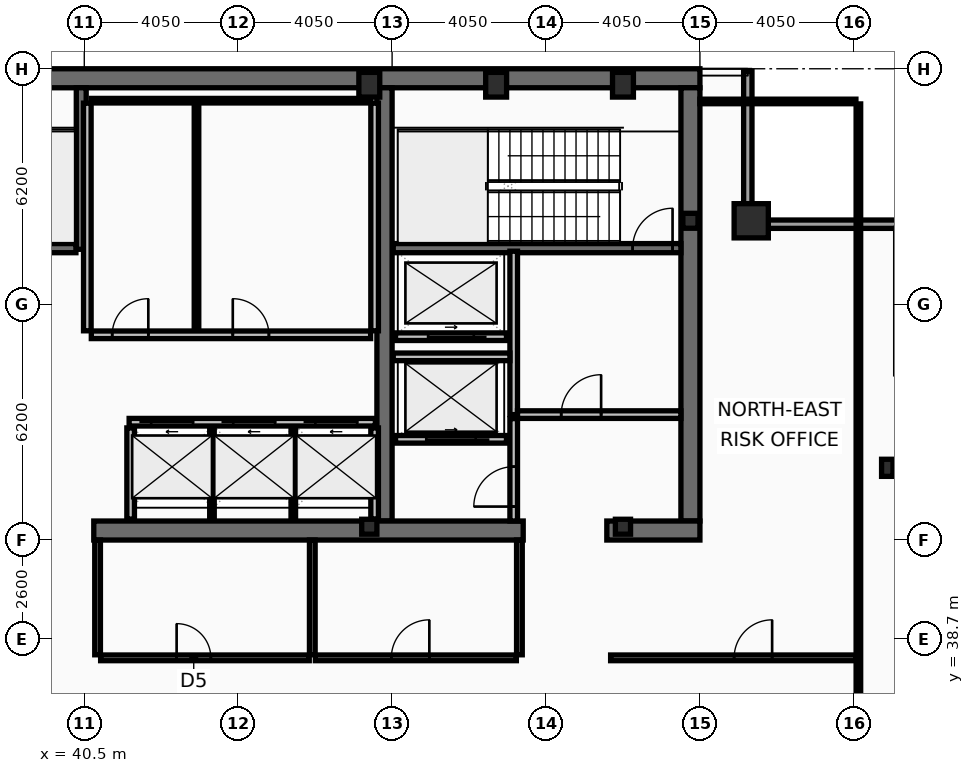
"""IFC4 building model, lengths in metres.
Left out: names, types, materials, properties, quantities, classifications, styles, units other than length and angle.
Written with IfcOpenShell. Run it as: python <this file> out.ifc"""

import sys

from ifc_helpers import new_model, si_unit, direction, frame, frame_2d, origin, origin_2d, place, context, subcontext, project, spatial, rectangle, hollow_rectangle, i_section, extrude, element, fill, save


model = new_model("IFC4")
c1 = context("Model", 3, precision=1e-05, world=origin(), true_north=direction((0.0, 1.0)))
c2 = subcontext(c1, "Body", "Model", "MODEL_VIEW")
j1 = project(units=[si_unit("LENGTHUNIT", "METRE"), si_unit("PLANEANGLEUNIT", "RADIAN")], contexts=[c1])
p1 = place(None, origin())
s1 = spatial("IfcSite", under=j1, at=p1, CompositionType="ELEMENT")
p2 = place(p1, origin())
s2 = spatial("IfcBuilding", under=s1, at=p2, CompositionType="ELEMENT")
p3 = place(p2, frame((0.0, 0.0, 310.2)))
s3 = spatial("IfcBuildingStorey", under=s2, at=p3, CompositionType="ELEMENT", Elevation=310.2)
p4 = place(p3, frame((16.2, 53.45, 0.0), z_axis=(0.0, 0.0, 1.0), x_axis=(1.0, 0.0, 0.0)))
e1 = element("IfcWall", 1, at=p4, inside=s3, PredefinedType="SHEAR", context=c2, shape_type="SweptSolid", body=[
    extrude(rectangle(XDim=40.5, YDim=0.5, at=frame_2d((20.25, 0.0))), origin(), (0.0, 0.0, 1.0), 4.24),
])
p5 = place(p3, frame((56.45, 53.2, 0.0), z_axis=(0.0, 0.0, 1.0), x_axis=(0.0, -1.0, 0.0)))
e2 = element("IfcWall", 2, at=p5, inside=s3, PredefinedType="SHEAR", context=c2, shape_type="SweptSolid", body=[
    extrude(rectangle(XDim=11.4, YDim=0.5, at=frame_2d((5.7, 0.0))), origin(), (0.0, 0.0, 1.0), 4.24),
])
p6 = place(p3, frame((48.4, 41.8, 0.0), z_axis=(0.0, 0.0, 1.0), x_axis=(0.0, 1.0, 0.0)))
e3 = element("IfcWall", 3, at=p6, inside=s3, PredefinedType="SHEAR", context=c2, shape_type="SweptSolid", body=[
    extrude(rectangle(XDim=11.4, YDim=0.4, at=frame_2d((5.7, 0.0))), origin(), (0.0, 0.0, 1.0), 4.24),
])
p7 = place(p3, frame((52.05, 41.55, 0.0), z_axis=(0.0, 0.0, 1.0), x_axis=(-1.0, 0.0, 0.0)))
e4 = element("IfcWall", 4, at=p7, inside=s3, PredefinedType="SHEAR", context=c2, shape_type="SweptSolid", body=[
    extrude(rectangle(XDim=11.3, YDim=0.5, at=frame_2d((5.65, 0.0))), origin(), (0.0, 0.0, 1.0), 4.24),
])
p8 = place(p3, frame((56.7, 41.55, 0.0), z_axis=(0.0, 0.0, 1.0), x_axis=(-1.0, 0.0, 0.0)))
e5 = element("IfcWall", 5, at=p8, inside=s3, PredefinedType="SHEAR", context=c2, shape_type="SweptSolid", body=[
    extrude(rectangle(XDim=2.45, YDim=0.5, at=frame_2d((1.225, 0.0))), origin(), (0.0, 0.0, 1.0), 4.24),
])
p9 = place(p3, frame((40.42, 48.95, 0.0), z_axis=(0.0, 0.0, 1.0), x_axis=(0.0, 1.0, 0.0)))
e6 = element("IfcWall", 6, at=p9, inside=s3, PredefinedType="SHEAR", context=c2, shape_type="SweptSolid", body=[
    extrude(rectangle(XDim=4.25, YDim=0.26, at=frame_2d((2.125, 0.0))), origin(), (0.0, 0.0, 1.0), 4.24),
])
p10 = place(p3, frame((48.63, 48.98, 0.0), z_axis=(0.0, 0.0, 1.0), x_axis=(1.0, 0.0, 0.0)))
e7 = element("IfcWall", 7, at=p10, inside=s3, PredefinedType="SHEAR", context=c2, shape_type="SweptSolid", body=[
    extrude(rectangle(XDim=7.57, YDim=0.24, at=frame_2d((3.785, 0.0))), origin(), (0.0, 0.0, 1.0), 4.24),
])
p11 = place(p10, frame((6.3, 0.0, 0.0)))
e8 = element("IfcOpeningElement", 8, at=p11, cuts=e7, PredefinedType="OPENING", context=c2, shape_type="SweptSolid", body=[
    extrude(rectangle(XDim=1.05, YDim=2.15, at=frame_2d((0.525, 1.075))), frame((0.0, 0.13, 0.0), z_axis=(0.0, -1.0, 0.0), x_axis=(1.0, 0.0, 0.0)), (0.0, 0.0, 1.0), 0.26),
])
p12 = place(p3, frame((32.72, 48.98, 0.0), z_axis=(0.0, 0.0, 1.0), x_axis=(1.0, 0.0, 0.0)))
e9 = element("IfcWall", 9, at=p12, inside=s3, PredefinedType="SHEAR", context=c2, shape_type="SweptSolid", body=[
    extrude(rectangle(XDim=7.56, YDim=0.24, at=frame_2d((3.78, 0.0))), origin(), (0.0, 0.0, 1.0), 4.24),
])
p13 = place(p12, frame((0.22, 0.0, 0.0)))
e10 = element("IfcOpeningElement", 10, at=p13, cuts=e9, PredefinedType="OPENING", context=c2, shape_type="SweptSolid", body=[
    extrude(rectangle(XDim=1.05, YDim=2.15, at=frame_2d((0.525, 1.075))), frame((0.0, 0.13, 0.0), z_axis=(0.0, -1.0, 0.0), x_axis=(1.0, 0.0, 0.0)), (0.0, 0.0, 1.0), 0.26),
])
p14 = place(p3, frame((58.05, 49.7, 0.0), z_axis=(0.0, 0.0, 1.0), x_axis=(1.0, 0.0, 0.0)))
e11 = element("IfcColumn", 11, at=p14, inside=s3, PredefinedType="COLUMN", context=c2, shape_type="SweptSolid", body=[
    extrude(hollow_rectangle(XDim=0.9, YDim=0.9, WallThickness=0.05, at=origin_2d()), origin(), (0.0, 0.0, 1.0), 4.4),
])
for number, where, z_axis, x_axis in (
    (12, (48.0, 53.28, 0.0), (0.0, 0.0, 1.0), (1.0, 0.0, 0.0)),
    (13, (51.337, 53.28, 0.0), (0.0, 0.0, 1.0), (1.0, 0.0, 0.0)),
    (14, (54.675, 53.28, 0.0), (0.0, 0.0, 1.0), (1.0, 0.0, 0.0)),
):
    element("IfcColumn", number, at=place(p3, frame(where, z_axis=z_axis, x_axis=x_axis)), inside=s3, PredefinedType="COLUMN", context=c2, shape_type="SweptSolid", body=[
        extrude(hollow_rectangle(XDim=0.55, YDim=0.65, WallThickness=0.04, at=origin_2d()), origin(), (0.0, 0.0, 1.0), 4.4),
    ])
p15 = place(p3, frame((61.63, 43.2, 0.0), z_axis=(0.0, 0.0, 1.0), x_axis=(1.0, 0.0, 0.0)))
e15 = element("IfcColumn", 15, at=p15, inside=s3, PredefinedType="COLUMN", context=c2, shape_type="SweptSolid", body=[
    extrude(i_section(OverallWidth=0.3, OverallDepth=0.45, WebThickness=0.014, FlangeThickness=0.026, at=origin_2d()), origin(), (0.0, 0.0, 1.0), 4.4),
])
for number, where, z_axis, x_axis in (
    (16, (56.45, 49.7, 0.0), (0.0, 0.0, 1.0), (1.0, 0.0, 0.0)),
    (17, (48.0, 41.65, 0.0), (0.0, 0.0, 1.0), (1.0, 0.0, 0.0)),
    (18, (54.675, 41.65, 0.0), (0.0, 0.0, 1.0), (1.0, 0.0, 0.0)),
):
    element("IfcColumn", number, at=place(p3, frame(where, z_axis=z_axis, x_axis=x_axis)), inside=s3, PredefinedType="COLUMN", context=c2, shape_type="SweptSolid", body=[
        extrude(i_section(OverallWidth=0.399, OverallDepth=0.393, WebThickness=0.023, FlangeThickness=0.037, at=origin_2d()), origin(), (0.0, 0.0, 1.0), 4.4),
    ])
p16 = place(p3, frame((57.96, 53.63, 0.0), z_axis=(0.0, 0.0, 1.0), x_axis=(0.0, -1.0, 0.0)))
e19 = element("IfcWall", 19, at=p16, inside=s3, PredefinedType="SOLIDWALL", context=c2, shape_type="SweptSolid", body=[
    extrude(rectangle(XDim=3.91, YDim=0.22, at=frame_2d((1.955, 0.0))), origin(), (0.0, 0.0, 1.0), 3.68),
])
p17 = place(p3, frame((57.85, 49.61, 0.0), z_axis=(0.0, 0.0, 1.0), x_axis=(1.0, 0.0, 0.0)))
e20 = element("IfcWall", 20, at=p17, inside=s3, PredefinedType="SOLIDWALL", context=c2, shape_type="SweptSolid", body=[
    extrude(rectangle(XDim=4.22, YDim=0.22, at=frame_2d((2.11, 0.0))), origin(), (0.0, 0.0, 1.0), 3.68),
])
p18 = place(p3, frame((41.68, 44.4, 0.0), z_axis=(0.0, 0.0, 1.0), x_axis=(1.0, 0.0, 0.0)))
e21 = element("IfcWall", 21, at=p18, inside=s3, PredefinedType="PARTITIONING", context=c2, shape_type="SweptSolid", body=[
    extrude(rectangle(XDim=6.48, YDim=0.2, at=frame_2d((3.24, 0.0))), origin(), (0.0, 0.0, 1.0), 4.24),
])
p19 = place(p18, frame((0.58, 0.0, 0.0)))
e22 = element("IfcOpeningElement", 22, at=p19, cuts=e21, PredefinedType="OPENING", context=c2, shape_type="SweptSolid", body=[
    extrude(rectangle(XDim=1.1, YDim=2.18, at=frame_2d((0.55, 1.09))), frame((0.0, 0.11, 0.0), z_axis=(0.0, -1.0, 0.0), x_axis=(1.0, 0.0, 0.0)), (0.0, 0.0, 1.0), 0.22),
])
p20 = place(p18, frame((2.74, 0.0, 0.0)))
e23 = element("IfcOpeningElement", 23, at=p20, cuts=e21, PredefinedType="OPENING", context=c2, shape_type="SweptSolid", body=[
    extrude(rectangle(XDim=1.1, YDim=2.18, at=frame_2d((0.55, 1.09))), frame((0.0, 0.11, 0.0), z_axis=(0.0, -1.0, 0.0), x_axis=(1.0, 0.0, 0.0)), (0.0, 0.0, 1.0), 0.22),
])
p21 = place(p18, frame((4.9, 0.0, 0.0)))
e24 = element("IfcOpeningElement", 24, at=p21, cuts=e21, PredefinedType="OPENING", context=c2, shape_type="SweptSolid", body=[
    extrude(rectangle(XDim=1.1, YDim=2.18, at=frame_2d((0.55, 1.09))), frame((0.0, 0.11, 0.0), z_axis=(0.0, -1.0, 0.0), x_axis=(1.0, 0.0, 0.0)), (0.0, 0.0, 1.0), 0.22),
])
p22 = place(p3, frame((51.61, 43.95, 0.0), z_axis=(0.0, 0.0, 1.0), x_axis=(-1.0, 0.0, 0.0)))
e25 = element("IfcWall", 25, at=p22, inside=s3, PredefinedType="PARTITIONING", context=c2, shape_type="SweptSolid", body=[
    extrude(rectangle(XDim=2.92, YDim=0.2, at=frame_2d((1.46, 0.0))), origin(), (0.0, 0.0, 1.0), 4.24),
])
p23 = place(p22, frame((0.81, 0.0, 0.0)))
e26 = element("IfcOpeningElement", 26, at=p23, cuts=e25, PredefinedType="OPENING", context=c2, shape_type="SweptSolid", body=[
    extrude(rectangle(XDim=1.3, YDim=2.18, at=frame_2d((0.65, 1.09))), frame((0.0, 0.11, 0.0), z_axis=(0.0, -1.0, 0.0), x_axis=(1.0, 0.0, 0.0)), (0.0, 0.0, 1.0), 0.22),
])
p24 = place(p3, frame((51.61, 46.65, 0.0), z_axis=(0.0, 0.0, 1.0), x_axis=(-1.0, 0.0, 0.0)))
e27 = element("IfcWall", 27, at=p24, inside=s3, PredefinedType="PARTITIONING", context=c2, shape_type="SweptSolid", body=[
    extrude(rectangle(XDim=2.92, YDim=0.2, at=frame_2d((1.46, 0.0))), origin(), (0.0, 0.0, 1.0), 4.24),
])
p25 = place(p24, frame((0.86, 0.0, 0.0)))
e28 = element("IfcOpeningElement", 28, at=p25, cuts=e27, PredefinedType="OPENING", context=c2, shape_type="SweptSolid", body=[
    extrude(rectangle(XDim=1.2, YDim=2.18, at=frame_2d((0.6, 1.09))), frame((0.0, 0.11, 0.0), z_axis=(0.0, -1.0, 0.0), x_axis=(1.0, 0.0, 0.0)), (0.0, 0.0, 1.0), 0.22),
])
p26 = place(p3, frame((51.8, 44.6, 0.0), z_axis=(0.0, 0.0, 1.0), x_axis=(0.0, 1.0, 0.0)))
e29 = element("IfcWall", 29, at=p26, inside=s3, PredefinedType="PARTITIONING", context=c2, shape_type="SweptSolid", body=[
    extrude(rectangle(XDim=4.3, YDim=0.2, at=frame_2d((2.15, 0.0))), origin(), (0.0, 0.0, 1.0), 4.24),
])
p27 = place(p3, frame((51.9, 44.6, 0.0), z_axis=(0.0, 0.0, 1.0), x_axis=(1.0, 0.0, 0.0)))
e30 = element("IfcWall", 30, at=p27, inside=s3, PredefinedType="PARTITIONING", context=c2, shape_type="SweptSolid", body=[
    extrude(rectangle(XDim=4.3, YDim=0.2, at=frame_2d((2.15, 0.0))), origin(), (0.0, 0.0, 1.0), 4.24),
])
p28 = place(p27, frame((1.15, 0.0, 0.0)))
e31 = element("IfcOpeningElement", 31, at=p28, cuts=e30, PredefinedType="OPENING", context=c2, shape_type="SweptSolid", body=[
    extrude(rectangle(XDim=1.05, YDim=2.15, at=frame_2d((0.525, 1.075))), frame((0.0, 0.11, 0.0), z_axis=(0.0, -1.0, 0.0), x_axis=(1.0, 0.0, 0.0)), (0.0, 0.0, 1.0), 0.22),
])
p29 = place(p3, frame((48.63, 46.12, 0.0), z_axis=(0.0, 0.0, 1.0), x_axis=(1.0, 0.0, 0.0)))
e32 = element("IfcWall", 32, at=p29, inside=s3, PredefinedType="PARTITIONING", context=c2, shape_type="SweptSolid", body=[
    extrude(rectangle(XDim=3.07, YDim=0.2, at=frame_2d((1.535, 0.0))), origin(), (0.0, 0.0, 1.0), 4.24),
])
p30 = place(p3, frame((51.8, 41.8, 0.0), z_axis=(0.0, 0.0, 1.0), x_axis=(0.0, 1.0, 0.0)))
e33 = element("IfcWall", 33, at=p30, inside=s3, PredefinedType="PARTITIONING", context=c2, shape_type="SweptSolid", body=[
    extrude(rectangle(XDim=2.695, YDim=0.2, at=frame_2d((1.348, 0.0))), origin(), (0.0, 0.0, 1.0), 4.24),
])
p31 = place(p30, frame((0.38, 0.0, 0.0)))
e34 = element("IfcOpeningElement", 34, at=p31, cuts=e33, PredefinedType="OPENING", context=c2, shape_type="SweptSolid", body=[
    extrude(rectangle(XDim=1.05, YDim=2.15, at=frame_2d((0.525, 1.075))), frame((0.0, 0.11, 0.0), z_axis=(0.0, -1.0, 0.0), x_axis=(1.0, 0.0, 0.0)), (0.0, 0.0, 1.0), 0.22),
])
for number, where, z_axis, x_axis in (
    (35, (40.58, 46.805, 0.0), (0.0, 0.0, 1.0), (0.0, 1.0, 0.0)),
    (36, (48.14, 46.805, 0.0), (0.0, 0.0, 1.0), (0.0, 1.0, 0.0)),
):
    element("IfcWall", number, at=place(p3, frame(where, z_axis=z_axis, x_axis=x_axis)), inside=s3, PredefinedType="PARTITIONING", context=c2, shape_type="SweptSolid", body=[
        extrude(rectangle(XDim=5.99, YDim=0.2, at=frame_2d((2.995, 0.0))), origin(), (0.0, 0.0, 1.0), 4.24),
    ])
p32 = place(p3, frame((40.685, 52.86, 0.0), z_axis=(0.0, 0.0, 1.0), x_axis=(1.0, 0.0, 0.0)))
e37 = element("IfcWall", 37, at=p32, inside=s3, PredefinedType="PARTITIONING", context=c2, shape_type="SweptSolid", body=[
    extrude(rectangle(XDim=7.35, YDim=0.12, at=frame_2d((3.675, 0.0))), origin(), (0.0, 0.0, 1.0), 4.24),
])
p33 = place(p3, frame((43.453, 46.805, 0.0), z_axis=(0.0, 0.0, 1.0), x_axis=(0.0, 1.0, 0.0)))
e38 = element("IfcWall", 38, at=p33, inside=s3, PredefinedType="PARTITIONING", context=c2, shape_type="SweptSolid", body=[
    extrude(rectangle(XDim=5.99, YDim=0.12, at=frame_2d((2.995, 0.0))), origin(), (0.0, 0.0, 1.0), 4.24),
])
p34 = place(p3, frame((40.685, 46.7, 0.0), z_axis=(0.0, 0.0, 1.0), x_axis=(1.0, 0.0, 0.0)))
e39 = element("IfcWall", 39, at=p34, inside=s3, PredefinedType="PARTITIONING", context=c2, shape_type="SweptSolid", body=[
    extrude(rectangle(XDim=7.35, YDim=0.2, at=frame_2d((3.675, 0.0))), origin(), (0.0, 0.0, 1.0), 4.24),
])
p35 = place(p34, frame((0.55, 0.0, 0.0)))
e40 = element("IfcOpeningElement", 40, at=p35, cuts=e39, PredefinedType="OPENING", context=c2, shape_type="SweptSolid", body=[
    extrude(rectangle(XDim=0.95, YDim=2.1, at=frame_2d((0.475, 1.05))), frame((0.0, 0.11, 0.0), z_axis=(0.0, -1.0, 0.0), x_axis=(1.0, 0.0, 0.0)), (0.0, 0.0, 1.0), 0.22),
])
p36 = place(p34, frame((3.723, 0.0, 0.0)))
e41 = element("IfcOpeningElement", 41, at=p36, cuts=e39, PredefinedType="OPENING", context=c2, shape_type="SweptSolid", body=[
    extrude(rectangle(XDim=0.95, YDim=2.1, at=frame_2d((0.475, 1.05))), frame((0.0, 0.11, 0.0), z_axis=(0.0, -1.0, 0.0), x_axis=(1.0, 0.0, 0.0)), (0.0, 0.0, 1.0), 0.22),
])
for number, where, z_axis, x_axis in (
    (42, (41.72, 41.85, 0.0), (0.0, 0.0, 1.0), (0.0, 1.0, 0.0)),
    (43, (48.14, 41.85, 0.0), (0.0, 0.0, 1.0), (0.0, 1.0, 0.0)),
):
    element("IfcWall", number, at=place(p3, frame(where, z_axis=z_axis, x_axis=x_axis)), inside=s3, PredefinedType="PARTITIONING", context=c2, shape_type="SweptSolid", body=[
        extrude(rectangle(XDim=2.4, YDim=0.2, at=frame_2d((1.2, 0.0))), origin(), (0.0, 0.0, 1.0), 4.24),
    ])
for number, where, z_axis, x_axis in (
    (44, (43.86, 41.85, 0.0), (0.0, 0.0, 1.0), (0.0, 1.0, 0.0)),
    (45, (46.0, 41.85, 0.0), (0.0, 0.0, 1.0), (0.0, 1.0, 0.0)),
):
    element("IfcWall", number, at=place(p3, frame(where, z_axis=z_axis, x_axis=x_axis)), inside=s3, PredefinedType="PARTITIONING", context=c2, shape_type="SweptSolid", body=[
        extrude(rectangle(XDim=2.4, YDim=0.12, at=frame_2d((1.2, 0.0))), origin(), (0.0, 0.0, 1.0), 4.24),
    ])
p37 = place(p3, frame((40.93, 38.2, 0.0), z_axis=(0.0, 0.0, 1.0), x_axis=(1.0, 0.0, 0.0)))
e46 = element("IfcWall", 46, at=p37, inside=s3, PredefinedType="PARTITIONING", context=c2, shape_type="SweptSolid", body=[
    extrude(rectangle(XDim=5.49, YDim=0.15, at=frame_2d((2.745, 0.0))), origin(), (0.0, 0.0, 1.0), 4.24),
])
p38 = place(p37, frame((2.0, 0.0, 0.0)))
e47 = element("IfcOpeningElement", 47, at=p38, cuts=e46, PredefinedType="OPENING", context=c2, shape_type="SweptSolid", body=[
    extrude(rectangle(XDim=0.9, YDim=2.05, at=frame_2d((0.45, 1.025))), frame((0.0, 0.085, 0.0), z_axis=(0.0, -1.0, 0.0), x_axis=(1.0, 0.0, 0.0)), (0.0, 0.0, 1.0), 0.17),
])
p39 = place(p3, frame((46.58, 38.2, 0.0), z_axis=(0.0, 0.0, 1.0), x_axis=(1.0, 0.0, 0.0)))
e48 = element("IfcWall", 48, at=p39, inside=s3, PredefinedType="PARTITIONING", context=c2, shape_type="SweptSolid", body=[
    extrude(rectangle(XDim=5.29, YDim=0.15, at=frame_2d((2.645, 0.0))), origin(), (0.0, 0.0, 1.0), 3.63),
])
p40 = place(p39, frame((2.0, 0.0, 0.0)))
e49 = element("IfcOpeningElement", 49, at=p40, cuts=e48, PredefinedType="OPENING", context=c2, shape_type="SweptSolid", body=[
    extrude(rectangle(XDim=1.0, YDim=2.05, at=frame_2d((0.5, 1.025))), frame((0.0, 0.085, 0.0), z_axis=(0.0, -1.0, 0.0), x_axis=(1.0, 0.0, 0.0)), (0.0, 0.0, 1.0), 0.17),
])
for number, where, z_axis, x_axis in (
    (50, (40.85, 38.28, 0.0), (0.0, 0.0, 1.0), (0.0, 1.0, 0.0)),
    (51, (46.5, 38.28, 0.0), (0.0, 0.0, 1.0), (0.0, 1.0, 0.0)),
    (52, (51.95, 38.28, 0.0), (0.0, 0.0, 1.0), (0.0, 1.0, 0.0)),
):
    element("IfcWall", number, at=place(p3, frame(where, z_axis=z_axis, x_axis=x_axis)), inside=s3, PredefinedType="PARTITIONING", context=c2, shape_type="SweptSolid", body=[
        extrude(rectangle(XDim=3.02, YDim=0.15, at=frame_2d((1.51, 0.0))), origin(), (0.0, 0.0, 1.0), 4.24),
    ])
p41 = place(p3, frame((54.35, 38.2, 0.0), z_axis=(0.0, 0.0, 1.0), x_axis=(1.0, 0.0, 0.0)))
e53 = element("IfcWall", 53, at=p41, inside=s3, PredefinedType="PARTITIONING", context=c2, shape_type="SweptSolid", body=[
    extrude(rectangle(XDim=6.455, YDim=0.15, at=frame_2d((3.228, 0.0))), origin(), (0.0, 0.0, 1.0), 3.63),
])
p42 = place(p41, frame((3.25, 0.0, 0.0)))
e54 = element("IfcOpeningElement", 54, at=p42, cuts=e53, PredefinedType="OPENING", context=c2, shape_type="SweptSolid", body=[
    extrude(rectangle(XDim=1.0, YDim=2.05, at=frame_2d((0.5, 1.025))), frame((0.0, 0.085, 0.0), z_axis=(0.0, -1.0, 0.0), x_axis=(1.0, 0.0, 0.0)), (0.0, 0.0, 1.0), 0.17),
])
p43 = place(p3, frame((60.87, 10.665, 0.0), z_axis=(0.0, 0.0, 1.0), x_axis=(0.0, 1.0, 0.0)))
e55 = element("IfcWall", 55, at=p43, inside=s3, PredefinedType="PARTITIONING", context=c2, shape_type="SweptSolid", body=[
    extrude(rectangle(XDim=42.11, YDim=0.12, at=frame_2d((21.055, 0.0))), origin(), (0.0, 0.0, 1.0), 3.63),
])
p44 = place(p3, frame((56.7, 52.84, 0.0), z_axis=(0.0, 0.0, 1.0), x_axis=(1.0, 0.0, 0.0)))
e56 = element("IfcWall", 56, at=p44, inside=s3, PredefinedType="PARTITIONING", context=c2, shape_type="SweptSolid", body=[
    extrude(rectangle(XDim=4.105, YDim=0.12, at=frame_2d((2.052, 0.0))), origin(), (0.0, 0.0, 1.0), 4.24),
])
p45 = place(p11, origin())
e57 = element("IfcDoor", 57, at=p45, inside=s3, OperationType="SINGLE_SWING_RIGHT", PredefinedType="DOOR", context=c2, shape_type="SweptSolid", body=[
    extrude(rectangle(XDim=1.05, YDim=2.15, at=frame_2d((0.525, 1.075))), frame((0.0, 0.025, 0.0), z_axis=(0.0, -1.0, 0.0), x_axis=(1.0, 0.0, 0.0)), (0.0, 0.0, 1.0), 0.05),
])
fill(e8, e57)
p46 = place(p19, origin())
e58 = element("IfcDoor", 58, at=p46, inside=s3, OperationType="SLIDING_TO_LEFT", PredefinedType="DOOR", context=c2, shape_type="SweptSolid", body=[
    extrude(rectangle(XDim=1.1, YDim=2.18, at=frame_2d((0.55, 1.09))), frame((0.0, 0.025, 0.0), z_axis=(0.0, -1.0, 0.0), x_axis=(1.0, 0.0, 0.0)), (0.0, 0.0, 1.0), 0.05),
])
fill(e22, e58)
p47 = place(p20, origin())
e59 = element("IfcDoor", 59, at=p47, inside=s3, OperationType="SLIDING_TO_LEFT", PredefinedType="DOOR", context=c2, shape_type="SweptSolid", body=[
    extrude(rectangle(XDim=1.1, YDim=2.18, at=frame_2d((0.55, 1.09))), frame((0.0, 0.025, 0.0), z_axis=(0.0, -1.0, 0.0), x_axis=(1.0, 0.0, 0.0)), (0.0, 0.0, 1.0), 0.05),
])
fill(e23, e59)
p48 = place(p21, origin())
e60 = element("IfcDoor", 60, at=p48, inside=s3, OperationType="SLIDING_TO_LEFT", PredefinedType="DOOR", context=c2, shape_type="SweptSolid", body=[
    extrude(rectangle(XDim=1.1, YDim=2.18, at=frame_2d((0.55, 1.09))), frame((0.0, 0.025, 0.0), z_axis=(0.0, -1.0, 0.0), x_axis=(1.0, 0.0, 0.0)), (0.0, 0.0, 1.0), 0.05),
])
fill(e24, e60)
p49 = place(p23, origin())
e61 = element("IfcDoor", 61, at=p49, inside=s3, OperationType="SLIDING_TO_LEFT", PredefinedType="DOOR", context=c2, shape_type="SweptSolid", body=[
    extrude(rectangle(XDim=1.3, YDim=2.18, at=frame_2d((0.65, 1.09))), frame((0.0, 0.025, 0.0), z_axis=(0.0, -1.0, 0.0), x_axis=(1.0, 0.0, 0.0)), (0.0, 0.0, 1.0), 0.05),
])
fill(e26, e61)
p50 = place(p25, origin())
e62 = element("IfcDoor", 62, at=p50, inside=s3, OperationType="SLIDING_TO_LEFT", PredefinedType="DOOR", context=c2, shape_type="SweptSolid", body=[
    extrude(rectangle(XDim=1.2, YDim=2.18, at=frame_2d((0.6, 1.09))), frame((0.0, 0.025, 0.0), z_axis=(0.0, -1.0, 0.0), x_axis=(1.0, 0.0, 0.0)), (0.0, 0.0, 1.0), 0.05),
])
fill(e28, e62)
p51 = place(p28, origin())
e63 = element("IfcDoor", 63, at=p51, inside=s3, OperationType="SINGLE_SWING_RIGHT", PredefinedType="DOOR", context=c2, shape_type="SweptSolid", body=[
    extrude(rectangle(XDim=1.05, YDim=2.15, at=frame_2d((0.525, 1.075))), frame((0.0, 0.025, 0.0), z_axis=(0.0, -1.0, 0.0), x_axis=(1.0, 0.0, 0.0)), (0.0, 0.0, 1.0), 0.05),
])
fill(e31, e63)
p52 = place(p31, origin())
e64 = element("IfcDoor", 64, at=p52, inside=s3, OperationType="SINGLE_SWING_LEFT", PredefinedType="DOOR", context=c2, shape_type="SweptSolid", body=[
    extrude(rectangle(XDim=1.05, YDim=2.15, at=frame_2d((0.525, 1.075))), frame((0.0, 0.025, 0.0), z_axis=(0.0, -1.0, 0.0), x_axis=(1.0, 0.0, 0.0)), (0.0, 0.0, 1.0), 0.05),
])
fill(e34, e64)
p53 = place(p35, origin())
e65 = element("IfcDoor", 65, at=p53, inside=s3, OperationType="SINGLE_SWING_RIGHT", PredefinedType="DOOR", context=c2, shape_type="SweptSolid", body=[
    extrude(rectangle(XDim=0.95, YDim=2.1, at=frame_2d((0.475, 1.05))), frame((0.0, 0.025, 0.0), z_axis=(0.0, -1.0, 0.0), x_axis=(1.0, 0.0, 0.0)), (0.0, 0.0, 1.0), 0.05),
])
fill(e40, e65)
p54 = place(p36, origin())
e66 = element("IfcDoor", 66, at=p54, inside=s3, OperationType="SINGLE_SWING_LEFT", PredefinedType="DOOR", context=c2, shape_type="SweptSolid", body=[
    extrude(rectangle(XDim=0.95, YDim=2.1, at=frame_2d((0.475, 1.05))), frame((0.0, 0.025, 0.0), z_axis=(0.0, -1.0, 0.0), x_axis=(1.0, 0.0, 0.0)), (0.0, 0.0, 1.0), 0.05),
])
fill(e41, e66)
p55 = place(p38, origin())
e67 = element("IfcDoor", 67, at=p55, inside=s3, OperationType="SINGLE_SWING_LEFT", PredefinedType="DOOR", context=c2, shape_type="SweptSolid", body=[
    extrude(rectangle(XDim=0.9, YDim=2.05, at=frame_2d((0.45, 1.025))), frame((0.0, 0.025, 0.0), z_axis=(0.0, -1.0, 0.0), x_axis=(1.0, 0.0, 0.0)), (0.0, 0.0, 1.0), 0.05),
])
fill(e47, e67)
p56 = place(p40, origin())
e68 = element("IfcDoor", 68, at=p56, inside=s3, OperationType="SINGLE_SWING_RIGHT", PredefinedType="DOOR", context=c2, shape_type="SweptSolid", body=[
    extrude(rectangle(XDim=1.0, YDim=2.05, at=frame_2d((0.5, 1.025))), frame((0.0, 0.025, 0.0), z_axis=(0.0, -1.0, 0.0), x_axis=(1.0, 0.0, 0.0)), (0.0, 0.0, 1.0), 0.05),
])
fill(e49, e68)
p57 = place(p42, origin())
e69 = element("IfcDoor", 69, at=p57, inside=s3, OperationType="SINGLE_SWING_RIGHT", PredefinedType="DOOR", context=c2, shape_type="SweptSolid", body=[
    extrude(rectangle(XDim=1.0, YDim=2.05, at=frame_2d((0.5, 1.025))), frame((0.0, 0.025, 0.0), z_axis=(0.0, -1.0, 0.0), x_axis=(1.0, 0.0, 0.0)), (0.0, 0.0, 1.0), 0.05),
])
fill(e54, e69)
save(model, sys.argv[1])
